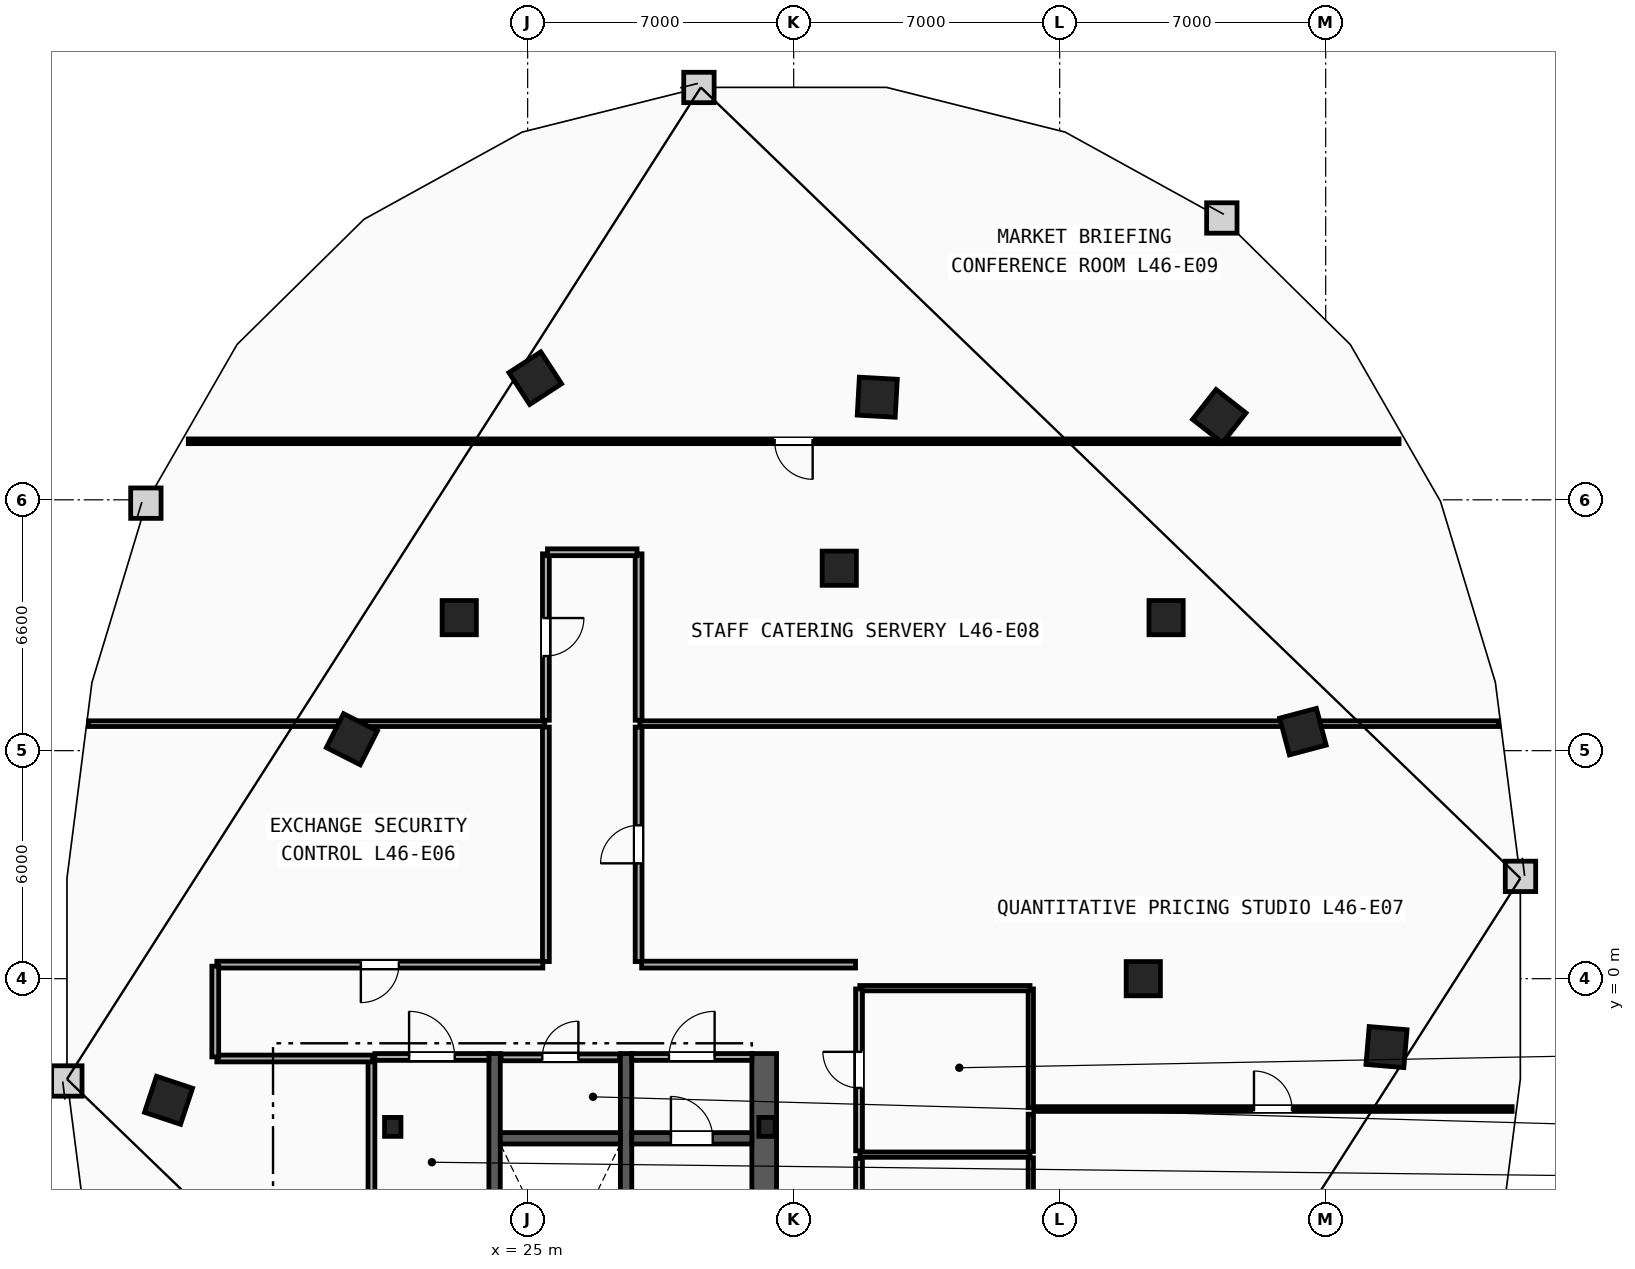
"""IFC4 building model, lengths in metres.
Left out: names, types, materials, properties, quantities, classifications, styles, units other than length and angle.
Written with IfcOpenShell. Run it as: python <this file> out.ifc"""

import sys

from ifc_helpers import new_model, si_unit, direction, frame, frame_2d, origin, origin_2d, place, context, subcontext, project, spatial, rectangle, i_section, extrude, element, fill, save


model = new_model("IFC4")
c1 = context("Model", 3, precision=1e-05, world=origin(), true_north=direction((0.0, 1.0)))
c2 = subcontext(c1, "Body", "Model", "MODEL_VIEW")
j1 = project(units=[si_unit("LENGTHUNIT", "METRE"), si_unit("PLANEANGLEUNIT", "RADIAN")], contexts=[c1])
p1 = place(None, origin())
s1 = spatial("IfcSite", under=j1, at=p1, CompositionType="ELEMENT")
p2 = place(p1, origin())
s2 = spatial("IfcBuilding", under=s1, at=p2, CompositionType="ELEMENT")
p3 = place(p2, frame((0.0, 0.0, 176.4)))
s3 = spatial("IfcBuildingStorey", under=s2, at=p3, CompositionType="ELEMENT", Elevation=176.4)
for number, where, z_axis, x_axis in (
    (1, (31.3, -3.9, 0.0), (0.0, 0.0, 1.0), (1.0, 0.0, 0.0)),
    (2, (21.45, -3.9, 0.0), (0.0, 0.0, 1.0), (1.0, 0.0, 0.0)),
):
    element("IfcColumn", number, at=place(p3, frame(where, z_axis=z_axis, x_axis=x_axis)), inside=s3, PredefinedType="COLUMN", context=c2, shape_type="SweptSolid", body=[
        extrude(i_section(OverallWidth=0.432, OverallDepth=0.498, WebThickness=0.056, FlangeThickness=0.089, FilletRadius=0.018, at=origin_2d()), origin(), (0.0, 0.0, 1.0), 3.6),
    ])
for number, where, z_axis, x_axis in (
    (3, (41.2, 0.0, 0.0), (0.0, 0.0, 1.0), (1.0, 0.0, 0.0)),
    (4, (41.8, 9.5, 0.0), (0.0, 0.0, 1.0), (1.0, 0.0, 0.0)),
    (5, (33.2, 10.8, 0.0), (0.0, 0.0, 1.0), (1.0, 0.0, 0.0)),
    (6, (23.2, 9.5, 0.0), (0.0, 0.0, 1.0), (1.0, 0.0, 0.0)),
):
    element("IfcColumn", number, at=place(p3, frame(where, z_axis=z_axis, x_axis=x_axis)), inside=s3, PredefinedType="COLUMN", context=c2, shape_type="SweptSolid", body=[
        extrude(rectangle(XDim=0.9, YDim=0.9, at=origin_2d()), origin(), (0.0, 0.0, 1.0), 3.6),
    ])
for number, where, z_axis, x_axis in (
    (7, (15.55, -3.2, 0.0), (0.0, 0.0, 1.0), (-0.315, -0.949, 0.0)),
    (8, (47.6, -1.8, 0.0), (0.0, 0.0, 1.0), (0.084, 0.997, 0.0)),
    (9, (45.4, 6.5, 0.0), (0.0, 0.0, 1.0), (-0.256, 0.967, 0.0)),
    (10, (43.2, 14.8, 0.0), (0.0, 0.0, 1.0), (-0.786, 0.618, 0.0)),
    (11, (34.2, 15.3, 0.0), (0.0, 0.0, 1.0), (-0.998, 0.055, 0.0)),
    (12, (25.2, 15.8, 0.0), (0.0, 0.0, 1.0), (-0.838, -0.546, 0.0)),
    (13, (20.375, 6.3, 0.0), (0.0, 0.0, 1.0), (-0.453, -0.892, 0.0)),
):
    element("IfcColumn", number, at=place(p3, frame(where, z_axis=z_axis, x_axis=x_axis)), inside=s3, PredefinedType="COLUMN", context=c2, shape_type="SweptSolid", body=[
        extrude(rectangle(XDim=1.0, YDim=1.0, at=origin_2d()), origin(), (0.0, 0.0, 1.0), 3.6),
    ])
p4 = place(p3, frame((31.225, -15.3, 0.0), z_axis=(0.0, 0.0, 1.0), x_axis=(0.0, 1.0, 0.0)))
e14 = element("IfcWall", 14, at=p4, inside=s3, PredefinedType="SHEAR", context=c2, shape_type="SweptSolid", body=[
    extrude(rectangle(XDim=13.33, YDim=0.65, at=frame_2d((6.665, 0.0))), origin(), (0.0, 0.0, 1.0), 3.36),
])
for number, where, z_axis, x_axis in (
    (15, (27.59, -12.65, 0.0), (0.0, 0.0, 1.0), (0.0, 1.0, 0.0)),
    (16, (24.13, -12.65, 0.0), (0.0, 0.0, 1.0), (0.0, 1.0, 0.0)),
):
    element("IfcWall", number, at=place(p3, frame(where, z_axis=z_axis, x_axis=x_axis)), inside=s3, PredefinedType="SHEAR", context=c2, shape_type="SweptSolid", body=[
        extrude(rectangle(XDim=10.68, YDim=0.3, at=frame_2d((5.34, 0.0))), origin(), (0.0, 0.0, 1.0), 3.36),
    ])
p5 = place(p3, frame((27.74, -4.2, 0.0), z_axis=(0.0, 0.0, 1.0), x_axis=(1.0, 0.0, 0.0)))
e17 = element("IfcWall", 17, at=p5, inside=s3, PredefinedType="SHEAR", context=c2, shape_type="SweptSolid", body=[
    extrude(rectangle(XDim=3.16, YDim=0.3, at=frame_2d((1.58, 0.0))), origin(), (0.0, 0.0, 1.0), 3.36),
])
p6 = place(p5, frame((1.03, 0.0, 0.0)))
e18 = element("IfcOpeningElement", 18, at=p6, cuts=e17, PredefinedType="OPENING", context=c2, shape_type="SweptSolid", body=[
    extrude(rectangle(XDim=1.1, YDim=2.15, at=frame_2d((0.55, 1.075))), frame((0.0, 0.16, 0.0), z_axis=(0.0, -1.0, 0.0), x_axis=(1.0, 0.0, 0.0)), (0.0, 0.0, 1.0), 0.32),
])
p7 = place(p3, frame((24.28, -4.2, 0.0), z_axis=(0.0, 0.0, 1.0), x_axis=(1.0, 0.0, 0.0)))
e19 = element("IfcWall", 19, at=p7, inside=s3, PredefinedType="SHEAR", context=c2, shape_type="SweptSolid", body=[
    extrude(rectangle(XDim=3.16, YDim=0.3, at=frame_2d((1.58, 0.0))), origin(), (0.0, 0.0, 1.0), 3.36),
])
p8 = place(p3, frame((20.89, -7.45, 0.0), z_axis=(0.0, 0.0, 1.0), x_axis=(0.0, 1.0, 0.0)))
e20 = element("IfcWall", 20, at=p8, inside=s3, PredefinedType="PARTITIONING", context=c2, shape_type="SweptSolid", body=[
    extrude(rectangle(XDim=5.3, YDim=0.18, at=frame_2d((2.65, 0.0))), origin(), (0.0, 0.0, 1.0), 3.36),
])
p9 = place(p3, frame((20.98, -2.06, 0.0), z_axis=(0.0, 0.0, 1.0), x_axis=(1.0, 0.0, 0.0)))
e21 = element("IfcWall", 21, at=p9, inside=s3, PredefinedType="PARTITIONING", context=c2, shape_type="SweptSolid", body=[
    extrude(rectangle(XDim=3.0, YDim=0.18, at=frame_2d((1.5, 0.0))), origin(), (0.0, 0.0, 1.0), 3.36),
])
p10 = place(p9, frame((0.9, 0.0, 0.0)))
e22 = element("IfcOpeningElement", 22, at=p10, cuts=e21, PredefinedType="OPENING", context=c2, shape_type="SweptSolid", body=[
    extrude(rectangle(XDim=1.2, YDim=2.15, at=frame_2d((0.6, 1.075))), frame((0.0, 0.1, 0.0), z_axis=(0.0, -1.0, 0.0), x_axis=(1.0, 0.0, 0.0)), (0.0, 0.0, 1.0), 0.2),
])
p11 = place(p3, frame((27.74, -2.06, 0.0), z_axis=(0.0, 0.0, 1.0), x_axis=(1.0, 0.0, 0.0)))
e23 = element("IfcWall", 23, at=p11, inside=s3, PredefinedType="PARTITIONING", context=c2, shape_type="SweptSolid", body=[
    extrude(rectangle(XDim=3.16, YDim=0.18, at=frame_2d((1.58, 0.0))), origin(), (0.0, 0.0, 1.0), 3.36),
])
p12 = place(p11, frame((0.98, 0.0, 0.0)))
e24 = element("IfcOpeningElement", 24, at=p12, cuts=e23, PredefinedType="OPENING", context=c2, shape_type="SweptSolid", body=[
    extrude(rectangle(XDim=1.2, YDim=2.15, at=frame_2d((0.6, 1.075))), frame((0.0, 0.1, 0.0), z_axis=(0.0, -1.0, 0.0), x_axis=(1.0, 0.0, 0.0)), (0.0, 0.0, 1.0), 0.2),
])
p13 = place(p3, frame((24.3, -2.07, 0.0), z_axis=(0.0, 0.0, 1.0), x_axis=(1.0, 0.0, 0.0)))
e25 = element("IfcWall", 25, at=p13, inside=s3, PredefinedType="PARTITIONING", context=c2, shape_type="SweptSolid", body=[
    extrude(rectangle(XDim=3.12, YDim=0.18, at=frame_2d((1.56, 0.0))), origin(), (0.0, 0.0, 1.0), 3.36),
])
p14 = place(p13, frame((1.085, 0.0, 0.0)))
e26 = element("IfcOpeningElement", 26, at=p14, cuts=e25, PredefinedType="OPENING", context=c2, shape_type="SweptSolid", body=[
    extrude(rectangle(XDim=0.95, YDim=2.1, at=frame_2d((0.475, 1.05))), frame((0.0, 0.1, 0.0), z_axis=(0.0, -1.0, 0.0), x_axis=(1.0, 0.0, 0.0)), (0.0, 0.0, 1.0), 0.2),
])
p15 = place(p3, frame((38.24, -8.395, 0.0), z_axis=(0.0, 0.0, 1.0), x_axis=(0.0, 1.0, 0.0)))
e27 = element("IfcWall", 27, at=p15, inside=s3, PredefinedType="PARTITIONING", context=c2, shape_type="SweptSolid", body=[
    extrude(rectangle(XDim=3.68, YDim=0.14, at=frame_2d((1.84, 0.0))), origin(), (0.0, 0.0, 1.0), 3.36),
])
p16 = place(p3, frame((38.24, -4.545, 0.0), z_axis=(0.0, 0.0, 1.0), x_axis=(0.0, 1.0, 0.0)))
e28 = element("IfcWall", 28, at=p16, inside=s3, PredefinedType="PARTITIONING", context=c2, shape_type="SweptSolid", body=[
    extrude(rectangle(XDim=0.98, YDim=0.14, at=frame_2d((0.49, 0.0))), origin(), (0.0, 0.0, 1.0), 3.36),
])
p17 = place(p3, frame((38.24, -3.395, 0.0), z_axis=(0.0, 0.0, 1.0), x_axis=(0.0, 1.0, 0.0)))
e29 = element("IfcWall", 29, at=p17, inside=s3, PredefinedType="PARTITIONING", context=c2, shape_type="SweptSolid", body=[
    extrude(rectangle(XDim=3.125, YDim=0.14, at=frame_2d((1.562, 0.0))), origin(), (0.0, 0.0, 1.0), 3.36),
])
for number, where, z_axis, x_axis in (
    (30, (33.74, -0.25, 0.0), (0.0, 0.0, 1.0), (1.0, 0.0, 0.0)),
    (31, (33.74, -4.63, 0.0), (0.0, 0.0, 1.0), (1.0, 0.0, 0.0)),
):
    element("IfcWall", number, at=place(p3, frame(where, z_axis=z_axis, x_axis=x_axis)), inside=s3, PredefinedType="PARTITIONING", context=c2, shape_type="SweptSolid", body=[
        extrude(rectangle(XDim=4.48, YDim=0.14, at=frame_2d((2.24, 0.0))), origin(), (0.0, 0.0, 1.0), 3.36),
    ])
p18 = place(p3, frame((33.72, -4.53, 0.0), z_axis=(0.0, 0.0, 1.0), x_axis=(0.0, 1.0, 0.0)))
e32 = element("IfcWall", 32, at=p18, inside=s3, PredefinedType="PARTITIONING", context=c2, shape_type="SweptSolid", body=[
    extrude(rectangle(XDim=4.26, YDim=0.18, at=frame_2d((2.13, 0.0))), origin(), (0.0, 0.0, 1.0), 3.36),
])
p19 = place(p18, frame((1.655, 0.0, 0.0)))
e33 = element("IfcOpeningElement", 33, at=p19, cuts=e32, PredefinedType="OPENING", context=c2, shape_type="SweptSolid", body=[
    extrude(rectangle(XDim=0.95, YDim=2.1, at=frame_2d((0.475, 1.05))), frame((0.0, 0.1, 0.0), z_axis=(0.0, -1.0, 0.0), x_axis=(1.0, 0.0, 0.0)), (0.0, 0.0, 1.0), 0.2),
])
p20 = place(p3, frame((33.72, -8.89, 0.0), z_axis=(0.0, 0.0, 1.0), x_axis=(0.0, 1.0, 0.0)))
e34 = element("IfcWall", 34, at=p20, inside=s3, PredefinedType="PARTITIONING", context=c2, shape_type="SweptSolid", body=[
    extrude(rectangle(XDim=4.16, YDim=0.18, at=frame_2d((2.08, 0.0))), origin(), (0.0, 0.0, 1.0), 3.36),
])
p21 = place(p20, frame((1.58, 0.0, 0.0)))
e35 = element("IfcOpeningElement", 35, at=p21, cuts=e34, PredefinedType="OPENING", context=c2, shape_type="SweptSolid", body=[
    extrude(rectangle(XDim=1.0, YDim=2.15, at=frame_2d((0.5, 1.075))), frame((0.0, 0.1, 0.0), z_axis=(0.0, -1.0, 0.0), x_axis=(1.0, 0.0, 0.0)), (0.0, 0.0, 1.0), 0.2),
])
p22 = place(p3, frame((13.447, 6.71, 0.0), z_axis=(0.0, 0.0, 1.0), x_axis=(1.0, 0.0, 0.0)))
e36 = element("IfcWall", 36, at=p22, inside=s3, PredefinedType="PARTITIONING", context=c2, shape_type="SweptSolid", body=[
    extrude(rectangle(XDim=12.003, YDim=0.15, at=frame_2d((6.001, 0.0))), origin(), (0.0, 0.0, 1.0), 3.36),
])
p23 = place(p3, frame((27.95, 6.71, 0.0), z_axis=(0.0, 0.0, 1.0), x_axis=(1.0, 0.0, 0.0)))
e37 = element("IfcWall", 37, at=p23, inside=s3, PredefinedType="PARTITIONING", context=c2, shape_type="SweptSolid", body=[
    extrude(rectangle(XDim=22.603, YDim=0.15, at=frame_2d((11.302, 0.0))), origin(), (0.0, 0.0, 1.0), 3.36),
])
p24 = place(p3, frame((25.4, 0.37, 0.0), z_axis=(0.0, 0.0, 1.0), x_axis=(-1.0, 0.0, 0.0)))
e38 = element("IfcWall", 38, at=p24, inside=s3, PredefinedType="PARTITIONING", context=c2, shape_type="SweptSolid", body=[
    extrude(rectangle(XDim=8.578, YDim=0.18, at=frame_2d((4.289, 0.0))), origin(), (0.0, 0.0, 1.0), 3.36),
])
p25 = place(p24, frame((3.789, 0.0, 0.0)))
e39 = element("IfcOpeningElement", 39, at=p25, cuts=e38, PredefinedType="OPENING", context=c2, shape_type="SweptSolid", body=[
    extrude(rectangle(XDim=1.0, YDim=2.15, at=frame_2d((0.5, 1.075))), frame((0.0, 0.1, 0.0), z_axis=(0.0, -1.0, 0.0), x_axis=(1.0, 0.0, 0.0)), (0.0, 0.0, 1.0), 0.2),
])
p26 = place(p3, frame((25.48, 6.62, 0.0), z_axis=(0.0, 0.0, 1.0), x_axis=(0.0, -1.0, 0.0)))
e40 = element("IfcWall", 40, at=p26, inside=s3, PredefinedType="PARTITIONING", context=c2, shape_type="SweptSolid", body=[
    extrude(rectangle(XDim=6.17, YDim=0.18, at=frame_2d((3.085, 0.0))), origin(), (0.0, 0.0, 1.0), 3.36),
])
p27 = place(p3, frame((16.822, -2.1, 0.0), z_axis=(0.0, 0.0, 1.0), x_axis=(1.0, 0.0, 0.0)))
e41 = element("IfcWall", 41, at=p27, inside=s3, PredefinedType="PARTITIONING", context=c2, shape_type="SweptSolid", body=[
    extrude(rectangle(XDim=4.098, YDim=0.18, at=frame_2d((2.049, 0.0))), origin(), (0.0, 0.0, 1.0), 3.36),
])
p28 = place(p3, frame((16.78, 0.329, 0.0), z_axis=(0.0, 0.0, 1.0), x_axis=(0.0, -1.0, 0.0)))
e42 = element("IfcWall", 42, at=p28, inside=s3, PredefinedType="PARTITIONING", context=c2, shape_type="SweptSolid", body=[
    extrude(rectangle(XDim=2.387, YDim=0.18, at=frame_2d((1.194, 0.0))), origin(), (0.0, 0.0, 1.0), 3.36),
])
p29 = place(p3, frame((27.92, 0.45, 0.0), z_axis=(0.0, 0.0, 1.0), x_axis=(0.0, 1.0, 0.0)))
e43 = element("IfcWall", 43, at=p29, inside=s3, PredefinedType="PARTITIONING", context=c2, shape_type="SweptSolid", body=[
    extrude(rectangle(XDim=6.17, YDim=0.18, at=frame_2d((3.085, 0.0))), origin(), (0.0, 0.0, 1.0), 3.36),
])
p30 = place(p29, frame((2.585, 0.0, 0.0)))
e44 = element("IfcOpeningElement", 44, at=p30, cuts=e43, PredefinedType="OPENING", context=c2, shape_type="SweptSolid", body=[
    extrude(rectangle(XDim=1.0, YDim=2.15, at=frame_2d((0.5, 1.075))), frame((0.0, 0.1, 0.0), z_axis=(0.0, -1.0, 0.0), x_axis=(1.0, 0.0, 0.0)), (0.0, 0.0, 1.0), 0.2),
])
p31 = place(p3, frame((33.628, 0.37, 0.0), z_axis=(0.0, 0.0, 1.0), x_axis=(-1.0, 0.0, 0.0)))
e45 = element("IfcWall", 45, at=p31, inside=s3, PredefinedType="PARTITIONING", context=c2, shape_type="SweptSolid", body=[
    extrude(rectangle(XDim=5.628, YDim=0.18, at=frame_2d((2.814, 0.0))), origin(), (0.0, 0.0, 1.0), 3.36),
])
p32 = place(p3, frame((25.48, 11.178, 0.0), z_axis=(0.0, 0.0, 1.0), x_axis=(0.0, -1.0, 0.0)))
e46 = element("IfcWall", 46, at=p32, inside=s3, PredefinedType="PARTITIONING", context=c2, shape_type="SweptSolid", body=[
    extrude(rectangle(XDim=4.378, YDim=0.18, at=frame_2d((2.189, 0.0))), origin(), (0.0, 0.0, 1.0), 3.36),
])
p33 = place(p32, frame((1.689, 0.0, 0.0)))
e47 = element("IfcOpeningElement", 47, at=p33, cuts=e46, PredefinedType="OPENING", context=c2, shape_type="SweptSolid", body=[
    extrude(rectangle(XDim=1.0, YDim=2.15, at=frame_2d((0.5, 1.075))), frame((0.0, 0.1, 0.0), z_axis=(0.0, -1.0, 0.0), x_axis=(1.0, 0.0, 0.0)), (0.0, 0.0, 1.0), 0.2),
])
p34 = place(p3, frame((27.92, 6.8, 0.0), z_axis=(0.0, 0.0, 1.0), x_axis=(0.0, 1.0, 0.0)))
e48 = element("IfcWall", 48, at=p34, inside=s3, PredefinedType="PARTITIONING", context=c2, shape_type="SweptSolid", body=[
    extrude(rectangle(XDim=4.378, YDim=0.18, at=frame_2d((2.189, 0.0))), origin(), (0.0, 0.0, 1.0), 3.36),
])
p35 = place(p3, frame((27.878, 11.22, 0.0), z_axis=(0.0, 0.0, 1.0), x_axis=(-1.0, 0.0, 0.0)))
e49 = element("IfcWall", 49, at=p35, inside=s3, PredefinedType="PARTITIONING", context=c2, shape_type="SweptSolid", body=[
    extrude(rectangle(XDim=2.357, YDim=0.18, at=frame_2d((1.178, 0.0))), origin(), (0.0, 0.0, 1.0), 3.36),
])
p36 = place(p3, frame((38.32, -3.43, 0.0), z_axis=(0.0, 0.0, 1.0), x_axis=(1.0, 0.0, 0.0)))
e50 = element("IfcWall", 50, at=p36, inside=s3, PredefinedType="PARTITIONING", context=c2, shape_type="SweptSolid", body=[
    extrude(rectangle(XDim=12.585, YDim=0.125, at=frame_2d((6.293, 0.0))), origin(), (0.0, 0.0, 1.0), 3.36),
])
p37 = place(p36, frame((5.793, 0.0, 0.0)))
e51 = element("IfcOpeningElement", 51, at=p37, cuts=e50, PredefinedType="OPENING", context=c2, shape_type="SweptSolid", body=[
    extrude(rectangle(XDim=1.0, YDim=2.15, at=frame_2d((0.5, 1.075))), frame((0.0, 0.073, 0.0), z_axis=(0.0, -1.0, 0.0), x_axis=(1.0, 0.0, 0.0)), (0.0, 0.0, 1.0), 0.145),
])
p38 = place(p3, frame((47.93, 14.14, 0.0), z_axis=(0.0, 0.0, 1.0), x_axis=(-1.0, 0.0, 0.0)))
e52 = element("IfcWall", 52, at=p38, inside=s3, PredefinedType="PARTITIONING", context=c2, shape_type="SweptSolid", body=[
    extrude(rectangle(XDim=31.86, YDim=0.125, at=frame_2d((15.93, 0.0))), origin(), (0.0, 0.0, 1.0), 3.36),
])
p39 = place(p38, frame((15.43, 0.0, 0.0)))
e53 = element("IfcOpeningElement", 53, at=p39, cuts=e52, PredefinedType="OPENING", context=c2, shape_type="SweptSolid", body=[
    extrude(rectangle(XDim=1.0, YDim=2.15, at=frame_2d((0.5, 1.075))), frame((0.0, 0.073, 0.0), z_axis=(0.0, -1.0, 0.0), x_axis=(1.0, 0.0, 0.0)), (0.0, 0.0, 1.0), 0.145),
])
p40 = place(p6, origin())
e54 = element("IfcDoor", 54, at=p40, inside=s3, OperationType="SINGLE_SWING_LEFT", PredefinedType="DOOR", context=c2, shape_type="SweptSolid", body=[
    extrude(rectangle(XDim=1.1, YDim=2.15, at=frame_2d((0.55, 1.075))), frame((0.0, 0.025, 0.0), z_axis=(0.0, -1.0, 0.0), x_axis=(1.0, 0.0, 0.0)), (0.0, 0.0, 1.0), 0.05),
])
fill(e18, e54)
p41 = place(p10, origin())
e55 = element("IfcDoor", 55, at=p41, inside=s3, OperationType="SINGLE_SWING_LEFT", PredefinedType="DOOR", context=c2, shape_type="SweptSolid", body=[
    extrude(rectangle(XDim=1.2, YDim=2.15, at=frame_2d((0.6, 1.075))), frame((0.0, 0.025, 0.0), z_axis=(0.0, -1.0, 0.0), x_axis=(1.0, 0.0, 0.0)), (0.0, 0.0, 1.0), 0.05),
])
fill(e22, e55)
p42 = place(p12, origin())
e56 = element("IfcDoor", 56, at=p42, inside=s3, OperationType="SINGLE_SWING_RIGHT", PredefinedType="DOOR", context=c2, shape_type="SweptSolid", body=[
    extrude(rectangle(XDim=1.2, YDim=2.15, at=frame_2d((0.6, 1.075))), frame((0.0, 0.025, 0.0), z_axis=(0.0, -1.0, 0.0), x_axis=(1.0, 0.0, 0.0)), (0.0, 0.0, 1.0), 0.05),
])
fill(e24, e56)
p43 = place(p39, origin())
e57 = element("IfcDoor", 57, at=p43, inside=s3, OperationType="SINGLE_SWING_LEFT", PredefinedType="DOOR", context=c2, shape_type="SweptSolid", body=[
    extrude(rectangle(XDim=1.0, YDim=2.15, at=frame_2d((0.5, 1.075))), frame((0.0, 0.025, 0.0), z_axis=(0.0, -1.0, 0.0), x_axis=(1.0, 0.0, 0.0)), (0.0, 0.0, 1.0), 0.05),
])
fill(e53, e57)
p44 = place(p37, origin())
e58 = element("IfcDoor", 58, at=p44, inside=s3, OperationType="SINGLE_SWING_LEFT", PredefinedType="DOOR", context=c2, shape_type="SweptSolid", body=[
    extrude(rectangle(XDim=1.0, YDim=2.15, at=frame_2d((0.5, 1.075))), frame((0.0, 0.025, 0.0), z_axis=(0.0, -1.0, 0.0), x_axis=(1.0, 0.0, 0.0)), (0.0, 0.0, 1.0), 0.05),
])
fill(e51, e58)
p45 = place(p25, origin())
e59 = element("IfcDoor", 59, at=p45, inside=s3, OperationType="SINGLE_SWING_RIGHT", PredefinedType="DOOR", context=c2, shape_type="SweptSolid", body=[
    extrude(rectangle(XDim=1.0, YDim=2.15, at=frame_2d((0.5, 1.075))), frame((0.0, 0.025, 0.0), z_axis=(0.0, -1.0, 0.0), x_axis=(1.0, 0.0, 0.0)), (0.0, 0.0, 1.0), 0.05),
])
fill(e39, e59)
p46 = place(p30, origin())
e60 = element("IfcDoor", 60, at=p46, inside=s3, OperationType="SINGLE_SWING_LEFT", PredefinedType="DOOR", context=c2, shape_type="SweptSolid", body=[
    extrude(rectangle(XDim=1.0, YDim=2.15, at=frame_2d((0.5, 1.075))), frame((0.0, 0.025, 0.0), z_axis=(0.0, -1.0, 0.0), x_axis=(1.0, 0.0, 0.0)), (0.0, 0.0, 1.0), 0.05),
])
fill(e44, e60)
p47 = place(p33, origin())
e61 = element("IfcDoor", 61, at=p47, inside=s3, OperationType="SINGLE_SWING_LEFT", PredefinedType="DOOR", context=c2, shape_type="SweptSolid", body=[
    extrude(rectangle(XDim=1.0, YDim=2.15, at=frame_2d((0.5, 1.075))), frame((0.0, 0.025, 0.0), z_axis=(0.0, -1.0, 0.0), x_axis=(1.0, 0.0, 0.0)), (0.0, 0.0, 1.0), 0.05),
])
fill(e47, e61)
p48 = place(p19, origin())
e62 = element("IfcDoor", 62, at=p48, inside=s3, OperationType="SINGLE_SWING_RIGHT", PredefinedType="DOOR", context=c2, shape_type="SweptSolid", body=[
    extrude(rectangle(XDim=0.95, YDim=2.1, at=frame_2d((0.475, 1.05))), frame((0.0, 0.025, 0.0), z_axis=(0.0, -1.0, 0.0), x_axis=(1.0, 0.0, 0.0)), (0.0, 0.0, 1.0), 0.05),
])
fill(e33, e62)
p49 = place(p14, origin())
e63 = element("IfcDoor", 63, at=p49, inside=s3, OperationType="SINGLE_SWING_RIGHT", PredefinedType="DOOR", context=c2, shape_type="SweptSolid", body=[
    extrude(rectangle(XDim=0.95, YDim=2.1, at=frame_2d((0.475, 1.05))), frame((0.0, 0.025, 0.0), z_axis=(0.0, -1.0, 0.0), x_axis=(1.0, 0.0, 0.0)), (0.0, 0.0, 1.0), 0.05),
])
fill(e26, e63)
save(model, sys.argv[1])
